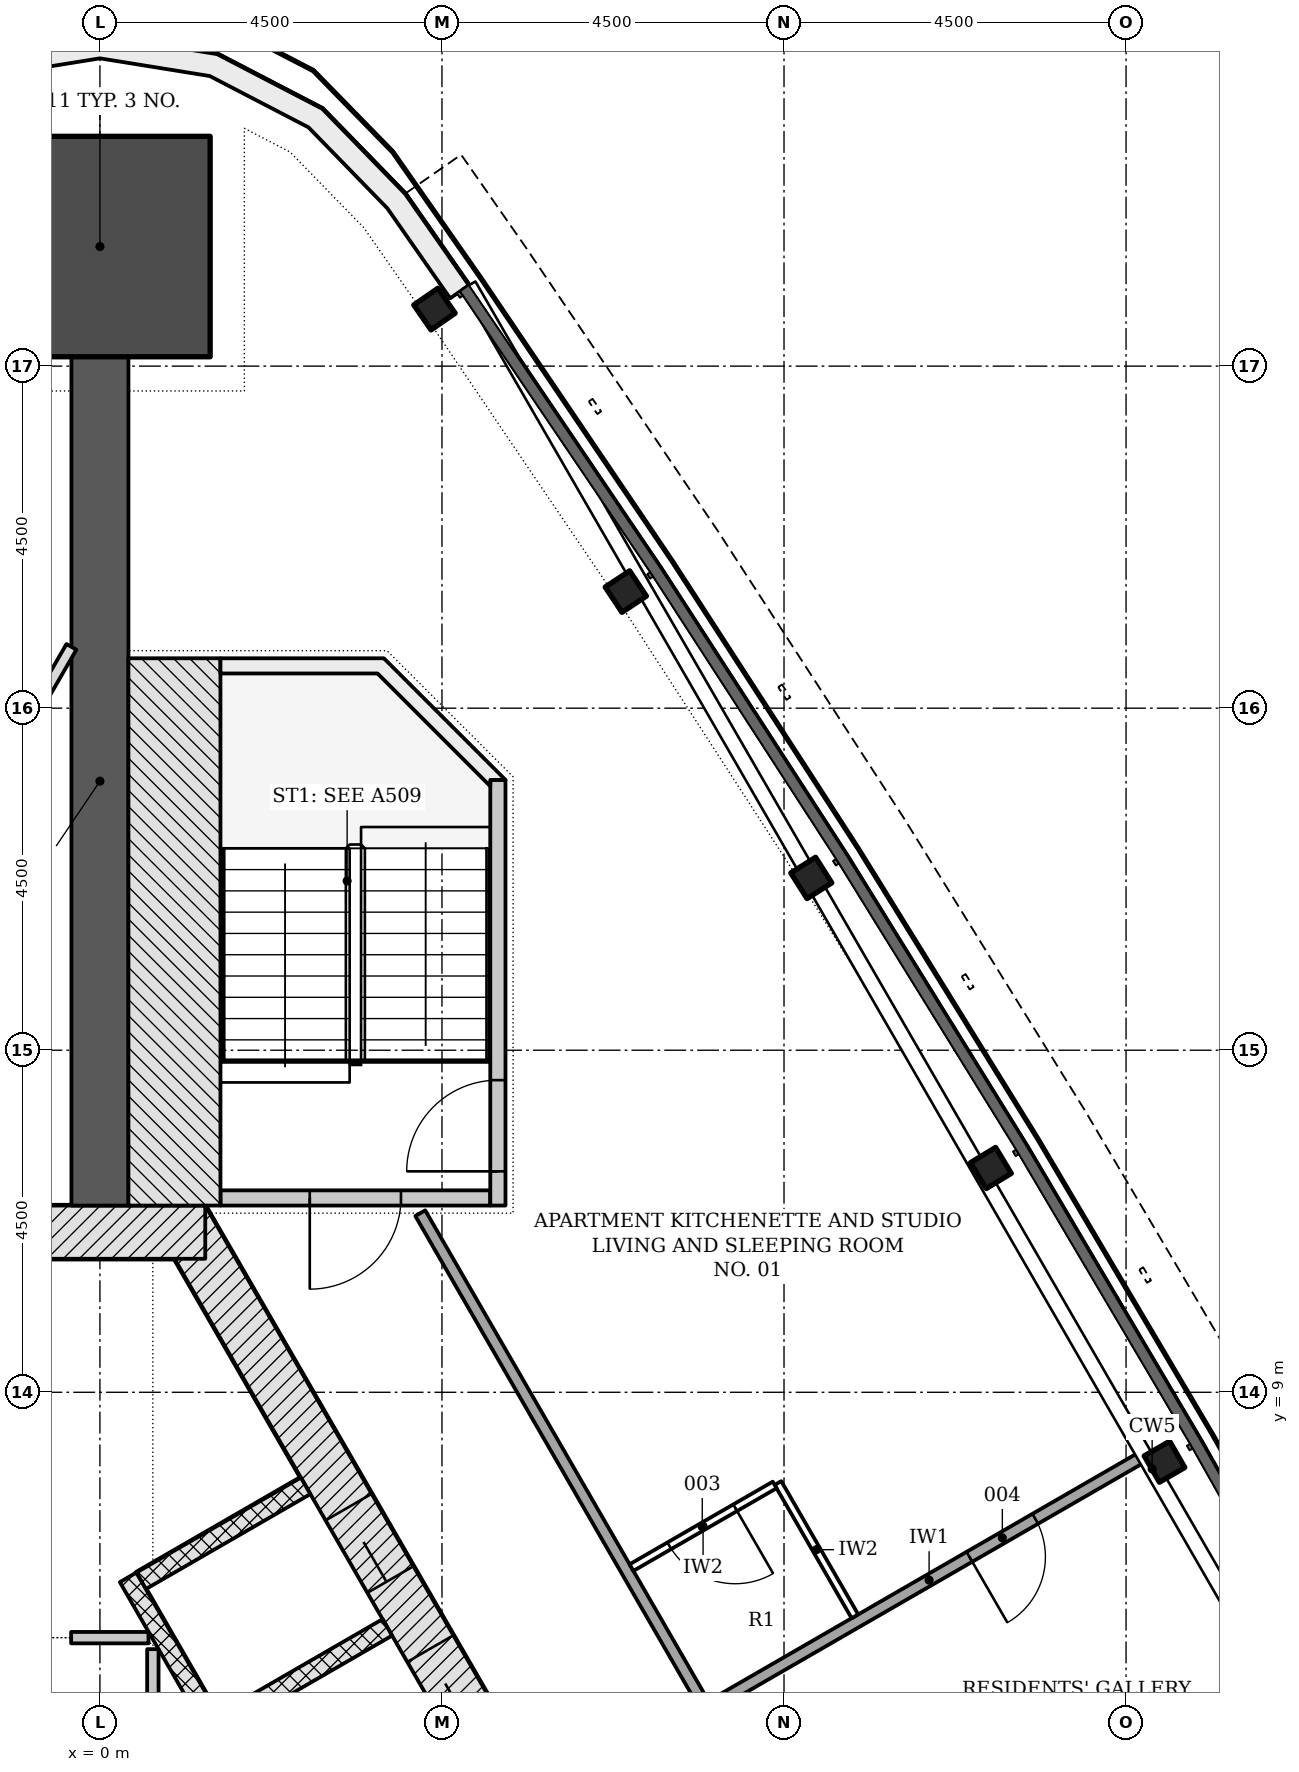
"""IFC4 building model, lengths in metres.
Left out: names, types, materials, properties, quantities, classifications, styles, units other than length and angle.
Written with IfcOpenShell. Run it as: python <this file> out.ifc"""

import sys

from ifc_helpers import new_model, si_unit, direction, frame, frame_2d, origin, origin_2d, place, context, subcontext, project, spatial, polyline, rectangle, i_section, outline, extrude, element, fill, save


model = new_model("IFC4")
c1 = context("Model", 3, precision=1e-05, world=origin(), true_north=direction((0.0, 1.0)))
c2 = subcontext(c1, "Body", "Model", "MODEL_VIEW")
j1 = project(units=[si_unit("LENGTHUNIT", "METRE"), si_unit("PLANEANGLEUNIT", "RADIAN")], contexts=[c1])
p1 = place(None, origin())
s1 = spatial("IfcSite", under=j1, at=p1, CompositionType="ELEMENT")
p2 = place(p1, origin())
s2 = spatial("IfcBuilding", under=s1, at=p2, CompositionType="ELEMENT")
p3 = place(p2, frame((0.0, 0.0, 140.1)))
s3 = spatial("IfcBuildingStorey", under=s2, at=p3, CompositionType="ELEMENT", Elevation=140.1)
p4 = place(p3, frame((10.311, -4.703, -0.2), z_axis=(0.0, 0.0, 1.0), x_axis=(-0.500001446645, 0.866024568562, 0.0)))
e1 = element("IfcWall", 1, at=p4, inside=s3, PredefinedType="SHEAR", context=c2, shape_type="SweptSolid", body=[
    extrude(rectangle(XDim=18.458, YDim=0.7, at=frame_2d((9.229, 0.0))), origin(), (0.0, 0.0, 1.0), 3.6),
])
p5 = place(p4, frame((4.379, 0.0, 0.2)))
e2 = element("IfcOpeningElement", 2, at=p5, cuts=e1, PredefinedType="OPENING", context=c2, shape_type="SweptSolid", body=[
    extrude(rectangle(XDim=1.1, YDim=2.1, at=frame_2d((0.55, 1.05))), frame((0.0, 0.36, 0.0), z_axis=(0.0, -1.0, 0.0), x_axis=(1.0, 0.0, 0.0)), (0.0, 0.0, 1.0), 0.72),
])
p6 = place(p4, frame((6.529, 0.0, 0.2)))
e3 = element("IfcOpeningElement", 3, at=p6, cuts=e1, PredefinedType="OPENING", context=c2, shape_type="SweptSolid", body=[
    extrude(rectangle(XDim=1.1, YDim=2.1, at=frame_2d((0.55, 1.05))), frame((0.0, 0.36, 0.0), z_axis=(0.0, -1.0, 0.0), x_axis=(1.0, 0.0, 0.0)), (0.0, 0.0, 1.0), 0.72),
])
p7 = place(p4, frame((8.679, 0.0, 0.2)))
e4 = element("IfcOpeningElement", 4, at=p7, cuts=e1, PredefinedType="OPENING", context=c2, shape_type="SweptSolid", body=[
    extrude(rectangle(XDim=1.1, YDim=2.1, at=frame_2d((0.55, 1.05))), frame((0.0, 0.36, 0.0), z_axis=(0.0, -1.0, 0.0), x_axis=(1.0, 0.0, 0.0)), (0.0, 0.0, 1.0), 0.72),
])
p8 = place(p4, frame((10.829, 0.0, 0.2)))
e5 = element("IfcOpeningElement", 5, at=p8, cuts=e1, PredefinedType="OPENING", context=c2, shape_type="SweptSolid", body=[
    extrude(rectangle(XDim=1.1, YDim=2.1, at=frame_2d((0.55, 1.05))), frame((0.0, 0.36, 0.0), z_axis=(0.0, -1.0, 0.0), x_axis=(1.0, 0.0, 0.0)), (0.0, 0.0, 1.0), 0.72),
])
p9 = place(p4, frame((12.979, 0.0, 0.2)))
e6 = element("IfcOpeningElement", 6, at=p9, cuts=e1, PredefinedType="OPENING", context=c2, shape_type="SweptSolid", body=[
    extrude(rectangle(XDim=1.1, YDim=2.1, at=frame_2d((0.55, 1.05))), frame((0.0, 0.36, 0.0), z_axis=(0.0, -1.0, 0.0), x_axis=(1.0, 0.0, 0.0)), (0.0, 0.0, 1.0), 0.72),
])
p10 = place(p3, frame((1.386, 11.106, -0.2), z_axis=(0.0, 0.0, 1.0), x_axis=(-1.0, 0.0, 0.0)))
e7 = element("IfcWall", 7, at=p10, inside=s3, PredefinedType="SHEAR", context=c2, shape_type="SweptSolid", body=[
    extrude(rectangle(XDim=2.771, YDim=0.7, at=frame_2d((1.386, 0.0))), origin(), (0.0, 0.0, 1.0), 3.6),
])
p11 = place(p3, frame((0.0, 11.456, -0.2), z_axis=(0.0, 0.0, 1.0), x_axis=(0.0, 1.0, 0.0)))
e8 = element("IfcWall", 8, at=p11, inside=s3, PredefinedType="SHEAR", context=c2, shape_type="SweptSolid", body=[
    extrude(rectangle(XDim=11.167, YDim=0.75, at=frame_2d((5.583, 0.0))), origin(), (0.0, 0.0, 1.0), 3.6),
])
p12 = place(p3, frame((0.0, 24.073, -0.2), z_axis=(0.0, 0.0, 1.0), x_axis=(0.0, 1.0, 0.0)))
e9 = element("IfcColumn", 9, at=p12, inside=s3, PredefinedType="COLUMN", context=c2, shape_type="SweptSolid", body=[
    extrude(rectangle(XDim=2.9, YDim=2.9, at=origin_2d()), origin(), (0.0, 0.0, 1.0), 3.6),
])
for number, where, z_axis, x_axis in (
    (10, (14.006, 8.086, -0.2), (0.0, 0.0, 1.0), (-0.5, 0.866, 0.0)),
    (11, (11.722, 11.95, -0.2), (0.0, 0.0, 1.0), (-0.518, 0.856, 0.0)),
    (12, (9.359, 15.767, -0.2), (0.0, 0.0, 1.0), (-0.535, 0.845, 0.0)),
    (13, (6.918, 19.534, -0.2), (0.0, 0.0, 1.0), (-0.552, 0.834, 0.0)),
    (14, (4.401, 23.25, -0.2), (0.0, 0.0, 1.0), (-0.569, 0.822, 0.0)),
):
    element("IfcColumn", number, at=place(p3, frame(where, z_axis=z_axis, x_axis=x_axis)), inside=s3, PredefinedType="COLUMN", context=c2, shape_type="SweptSolid", body=[
        extrude(i_section(OverallWidth=0.399, OverallDepth=0.386, WebThickness=0.021, FlangeThickness=0.033, FilletRadius=0.015, at=origin_2d()), origin(), (0.0, 0.0, 1.0), 3.6),
    ])
p13 = place(p3, origin())
e15 = element("IfcWall", 15, at=p13, inside=s3, PredefinedType="NOTDEFINED", context=c2, shape_type="SweptSolid", body=[
    extrude(outline(polyline([(4.853, 23.563), (4.014, 24.767), (2.925, 25.885), (1.541, 26.605), (0.0, 26.853), (-1.541, 26.605), (-2.925, 25.885), (-4.014, 24.767), (-4.853, 23.563), (-4.607, 23.392), (-3.782, 24.575), (-2.744, 25.641), (-1.445, 26.316), (0.0, 26.549), (1.445, 26.316), (2.744, 25.641), (3.782, 24.575), (4.607, 23.392), (4.853, 23.563)])), origin(), (0.0, 0.0, 1.0), 3.3),
])
for number, where, z_axis, x_axis in (
    (16, (3.781, 5.907, -0.2), (0.0, 0.0, 1.0), (-0.866, -0.5, 0.0)),
    (17, (2.706, 7.769, -0.2), (0.0, 0.0, 1.0), (-0.866, -0.5, 0.0)),
):
    element("IfcWall", number, at=place(p3, frame(where, z_axis=z_axis, x_axis=x_axis)), inside=s3, PredefinedType="PARTITIONING", context=c2, shape_type="SweptSolid", body=[
        extrude(rectangle(XDim=2.5, YDim=0.25, at=frame_2d((1.25, 0.0))), origin(), (0.0, 0.0, 1.0), 3.6),
    ])
p14 = place(p3, frame((5.87, -2.961, 0.0), z_axis=(0.0, 0.0, 1.0), x_axis=(-0.50000615651, 0.866021849293, 0.0)))
e18 = element("IfcWall", 18, at=p14, inside=s3, PredefinedType="PARTITIONING", context=c2, shape_type="SweptSolid", body=[
    extrude(rectangle(XDim=11.0, YDim=0.25, at=frame_2d((5.5, 0.0))), origin(), (0.0, 0.0, 1.0), 3.4),
])
p15 = place(p3, frame((-0.379, 5.772, 0.0), z_axis=(0.0, 0.0, 1.0), x_axis=(1.0, 0.0, 0.0)))
e19 = element("IfcWall", 19, at=p15, inside=s3, PredefinedType="PARTITIONING", context=c2, shape_type="SweptSolid", body=[
    extrude(rectangle(XDim=1.018, YDim=0.15, at=frame_2d((0.509, 0.0))), origin(), (0.0, 0.0, 1.0), 3.4),
])
p16 = place(p3, frame((0.696, -5.928, 0.0), z_axis=(0.0, 0.0, 1.0), x_axis=(0.0, 1.0, 0.0)))
e20 = element("IfcWall", 20, at=p16, inside=s3, PredefinedType="PARTITIONING", context=c2, shape_type="SweptSolid", body=[
    extrude(rectangle(XDim=11.549, YDim=0.15, at=frame_2d((5.774, 0.0))), origin(), (0.0, 0.0, 1.0), 3.4),
])
p17 = place(p16, frame((6.673, 0.0, 0.0)))
e21 = element("IfcOpeningElement", 21, at=p17, cuts=e20, PredefinedType="OPENING", context=c2, shape_type="SweptSolid", body=[
    extrude(rectangle(XDim=0.9, YDim=2.1, at=frame_2d((0.45, 1.05))), frame((0.0, 0.085, 0.0), z_axis=(0.0, -1.0, 0.0), x_axis=(1.0, 0.0, 0.0)), (0.0, 0.0, 1.0), 0.17),
])
p18 = place(p3, frame((5.135, 11.556, -0.2), z_axis=(0.0, 0.0, 1.0), x_axis=(-1.0, 0.0, 0.0)))
e22 = element("IfcWall", 22, at=p18, inside=s3, PredefinedType="SHEAR", context=c2, shape_type="SweptSolid", body=[
    extrude(rectangle(XDim=3.55, YDim=0.2, at=frame_2d((1.775, 0.0))), origin(), (0.0, 0.0, 1.0), 3.6),
])
p19 = place(p18, frame((1.175, 0.0, 0.2)))
e23 = element("IfcOpeningElement", 23, at=p19, cuts=e22, PredefinedType="OPENING", context=c2, shape_type="SweptSolid", body=[
    extrude(rectangle(XDim=1.2, YDim=2.1, at=frame_2d((0.6, 1.05))), frame((0.0, 0.11, 0.0), z_axis=(0.0, -1.0, 0.0), x_axis=(1.0, 0.0, 0.0)), (0.0, 0.0, 1.0), 0.22),
])
p20 = place(p3, frame((5.236, 11.456, -0.2), z_axis=(0.0, 0.0, 1.0), x_axis=(0.0, 1.0, 0.0)))
e24 = element("IfcWall", 24, at=p20, inside=s3, PredefinedType="SHEAR", context=c2, shape_type="SweptSolid", body=[
    extrude(rectangle(XDim=5.6, YDim=0.2, at=frame_2d((2.8, 0.0))), origin(), (0.0, 0.0, 1.0), 3.6),
])
p21 = place(p20, frame((0.45, 0.0, 0.2)))
e25 = element("IfcOpeningElement", 25, at=p21, cuts=e24, PredefinedType="OPENING", context=c2, shape_type="SweptSolid", body=[
    extrude(rectangle(XDim=1.2, YDim=2.1, at=frame_2d((0.6, 1.05))), frame((0.0, 0.11, 0.0), z_axis=(0.0, -1.0, 0.0), x_axis=(1.0, 0.0, 0.0)), (0.0, 0.0, 1.0), 0.22),
])
p22 = place(p3, frame((0.98, 11.456, -0.2), z_axis=(0.0, 0.0, 1.0), x_axis=(0.0, 1.0, 0.0)))
e26 = element("IfcWall", 26, at=p22, inside=s3, PredefinedType="SHEAR", context=c2, shape_type="SweptSolid", body=[
    extrude(rectangle(XDim=7.2, YDim=1.211, at=frame_2d((3.6, 0.0))), origin(), (0.0, 0.0, 1.0), 3.6),
])
p23 = place(p3, frame((0.0, 0.0, -0.2)))
e27 = element("IfcWall", 27, at=p23, inside=s3, PredefinedType="SHEAR", context=c2, shape_type="SweptSolid", body=[
    extrude(outline(polyline([(5.336, 17.056), (3.736, 18.656), (1.586, 18.656), (1.586, 18.456), (3.653, 18.456), (5.135, 16.974), (5.135, 17.056), (5.135, 17.056), (5.135, 17.056), (5.135, 17.056), (5.135, 17.056), (5.135, 17.056), (5.135, 17.056), (5.135, 17.056), (5.135, 17.056), (5.135, 17.056), (5.135, 17.056), (5.135, 17.056), (5.135, 17.056), (5.135, 17.056), (5.135, 17.056), (5.135, 17.056), (5.135, 17.056), (5.336, 17.056)])), origin(), (0.0, 0.0, 1.0), 3.6),
])
p24 = place(p3, frame((7.979, 4.837, 0.0), z_axis=(0.0, 0.0, 1.0), x_axis=(-0.500014427086, 0.866017074142, 0.0)))
e28 = element("IfcWall", 28, at=p24, inside=s3, PredefinedType="PARTITIONING", context=c2, shape_type="SweptSolid", body=[
    extrude(rectangle(XDim=7.528, YDim=0.15, at=frame_2d((3.764, 0.0))), origin(), (0.0, 0.0, 1.0), 2.847),
])
p25 = place(p3, frame((13.774, 8.183, 0.0), z_axis=(0.0, 0.0, 1.0), x_axis=(-0.866027686223, -0.499996046679, 0.0)))
e29 = element("IfcWall", 29, at=p25, inside=s3, PredefinedType="PARTITIONING", context=c2, shape_type="SweptSolid", body=[
    extrude(rectangle(XDim=6.617, YDim=0.15, at=frame_2d((3.309, 0.0))), origin(), (0.0, 0.0, 1.0), 3.4),
])
p26 = place(p25, frame((1.696, 0.0, 0.0)))
e30 = element("IfcOpeningElement", 30, at=p26, cuts=e29, PredefinedType="OPENING", context=c2, shape_type="SweptSolid", body=[
    extrude(rectangle(XDim=1.0, YDim=2.1, at=frame_2d((0.5, 1.05))), frame((0.0, 0.085, 0.0), z_axis=(0.0, -1.0, 0.0), x_axis=(1.0, 0.0, 0.0)), (0.0, 0.0, 1.0), 0.17),
])
p27 = place(p3, frame((9.933, 6.052, 0.0), z_axis=(0.0, 0.0, 1.0), x_axis=(-0.499990325971, 0.866030989016, 0.0)))
e31 = element("IfcWall", 31, at=p27, inside=s3, PredefinedType="PARTITIONING", context=c2, shape_type="SweptSolid", body=[
    extrude(rectangle(XDim=2.025, YDim=0.1, at=frame_2d((1.012, 0.0))), origin(), (0.0, 0.0, 1.0), 3.4),
])
p28 = place(p3, frame((8.877, 7.781, 0.0), z_axis=(0.0, 0.0, 1.0), x_axis=(-0.865989304205, -0.500062521093, 0.0)))
e32 = element("IfcWall", 32, at=p28, inside=s3, PredefinedType="PARTITIONING", context=c2, shape_type="SweptSolid", body=[
    extrude(rectangle(XDim=2.175, YDim=0.1, at=frame_2d((1.087, 0.0))), origin(), (0.0, 0.0, 1.0), 3.4),
])
p29 = place(p28, frame((0.6, 0.0, 0.0)))
e33 = element("IfcOpeningElement", 33, at=p29, cuts=e32, PredefinedType="OPENING", context=c2, shape_type="SweptSolid", body=[
    extrude(rectangle(XDim=1.0, YDim=2.1, at=frame_2d((0.5, 1.05))), frame((0.0, 0.06, 0.0), z_axis=(0.0, -1.0, 0.0), x_axis=(1.0, 0.0, 0.0)), (0.0, 0.0, 1.0), 0.12),
])
p30 = place(p3, frame((-0.375, 18.807, 0.0), z_axis=(0.0, 0.0, 1.0), x_axis=(-0.499995562011, -0.866027966043, 0.0)))
e34 = element("IfcWall", 34, at=p30, inside=s3, PredefinedType="PARTITIONING", context=c2, shape_type="SweptSolid", body=[
    extrude(rectangle(XDim=11.942, YDim=0.15, at=frame_2d((5.971, 0.0))), origin(), (0.0, 0.0, 1.0), 2.852),
])
p31 = place(p8, origin())
e35 = element("IfcDoor", 35, at=p31, inside=s3, OperationType="DOUBLE_DOOR_SLIDING", PredefinedType="DOOR", context=c2, shape_type="SweptSolid", body=[
    extrude(rectangle(XDim=1.1, YDim=2.1, at=frame_2d((0.55, 1.05))), frame((0.0, 0.025, 0.0), z_axis=(0.0, -1.0, 0.0), x_axis=(1.0, 0.0, 0.0)), (0.0, 0.0, 1.0), 0.05),
])
fill(e5, e35)
p32 = place(p9, origin())
e36 = element("IfcDoor", 36, at=p32, inside=s3, OperationType="DOUBLE_DOOR_SLIDING", PredefinedType="DOOR", context=c2, shape_type="SweptSolid", body=[
    extrude(rectangle(XDim=1.1, YDim=2.1, at=frame_2d((0.55, 1.05))), frame((0.0, 0.025, 0.0), z_axis=(0.0, -1.0, 0.0), x_axis=(1.0, 0.0, 0.0)), (0.0, 0.0, 1.0), 0.05),
])
fill(e6, e36)
p33 = place(p19, origin())
e37 = element("IfcDoor", 37, at=p33, inside=s3, OperationType="SINGLE_SWING_RIGHT", PredefinedType="DOOR", context=c2, shape_type="SweptSolid", body=[
    extrude(rectangle(XDim=1.2, YDim=2.1, at=frame_2d((0.6, 1.05))), frame((0.0, 0.025, 0.0), z_axis=(0.0, -1.0, 0.0), x_axis=(1.0, 0.0, 0.0)), (0.0, 0.0, 1.0), 0.05),
])
fill(e23, e37)
p34 = place(p21, origin())
e38 = element("IfcDoor", 38, at=p34, inside=s3, OperationType="SINGLE_SWING_LEFT", PredefinedType="DOOR", context=c2, shape_type="SweptSolid", body=[
    extrude(rectangle(XDim=1.2, YDim=2.1, at=frame_2d((0.6, 1.05))), frame((0.0, 0.025, 0.0), z_axis=(0.0, -1.0, 0.0), x_axis=(1.0, 0.0, 0.0)), (0.0, 0.0, 1.0), 0.05),
])
fill(e25, e38)
p35 = place(p29, origin())
e39 = element("IfcDoor", 39, at=p35, inside=s3, OperationType="SINGLE_SWING_LEFT", PredefinedType="DOOR", context=c2, shape_type="SweptSolid", body=[
    extrude(rectangle(XDim=1.0, YDim=2.1, at=frame_2d((0.5, 1.05))), frame((0.0, 0.025, 0.0), z_axis=(0.0, -1.0, 0.0), x_axis=(1.0, 0.0, 0.0)), (0.0, 0.0, 1.0), 0.05),
])
fill(e33, e39)
p36 = place(p26, origin())
e40 = element("IfcDoor", 40, at=p36, inside=s3, OperationType="SINGLE_SWING_RIGHT", PredefinedType="DOOR", context=c2, shape_type="SweptSolid", body=[
    extrude(rectangle(XDim=1.0, YDim=2.1, at=frame_2d((0.5, 1.05))), frame((0.0, 0.025, 0.0), z_axis=(0.0, -1.0, 0.0), x_axis=(1.0, 0.0, 0.0)), (0.0, 0.0, 1.0), 0.05),
])
fill(e30, e40)
save(model, sys.argv[1])
